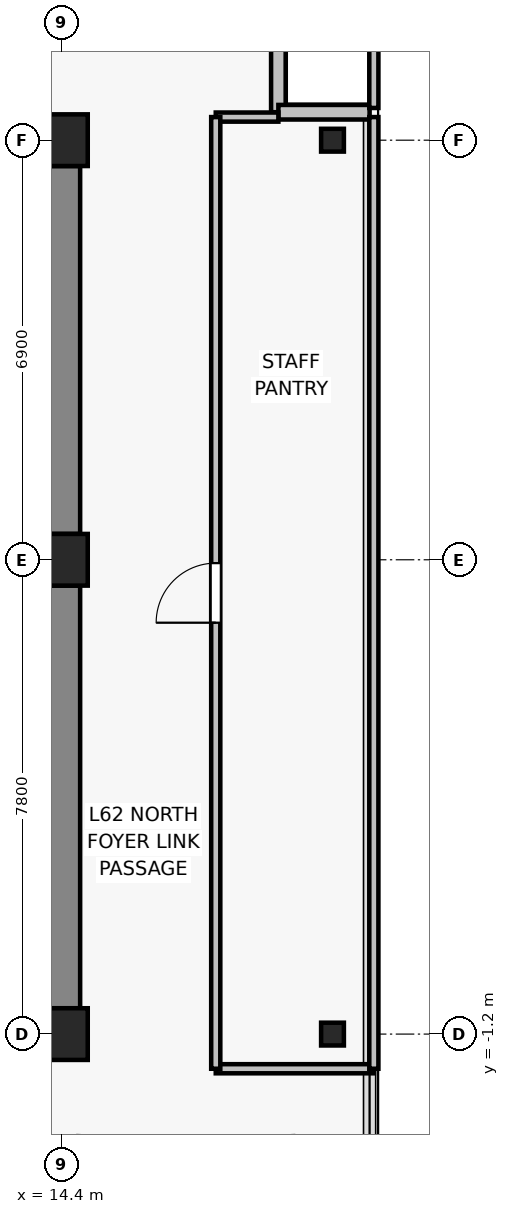
"""IFC4 building model, lengths in metres.
Left out: names, types, materials, properties, quantities, classifications, styles, units other than length and angle.
Written with IfcOpenShell. Run it as: python <this file> out.ifc"""

import sys

from ifc_helpers import new_model, si_unit, direction, frame, frame_2d, origin, origin_2d, place, context, subcontext, project, spatial, rectangle, i_section, extrude, source, transform, mapped, element, fill, save


model = new_model("IFC4")
c1 = context("Model", 3, precision=1e-05, world=origin(), true_north=direction((0.0, 1.0)))
c2 = subcontext(c1, "Body", "Model", "MODEL_VIEW")
j1 = project(units=[si_unit("LENGTHUNIT", "METRE"), si_unit("PLANEANGLEUNIT", "RADIAN")], contexts=[c1])
p1 = place(None, origin())
s1 = spatial("IfcSite", under=j1, at=p1, CompositionType="ELEMENT")
p2 = place(p1, origin())
s2 = spatial("IfcBuilding", under=s1, at=p2, CompositionType="ELEMENT")
p3 = place(p2, frame((0.0, 0.0, 222.1)))
s3 = spatial("IfcBuildingStorey", under=s2, at=p3, CompositionType="ELEMENT", Elevation=222.1)
for number, where, z_axis, x_axis in (
    (1, (14.4, -1.2, 0.0), (0.0, 0.0, 1.0), (1.0, 0.0, 0.0)),
    (2, (14.4, 6.6, 0.0), (0.0, 0.0, 1.0), (1.0, 0.0, 0.0)),
    (3, (14.4, 13.5, 0.0), (0.0, 0.0, 1.0), (1.0, 0.0, 0.0)),
):
    element("IfcColumn", number, at=place(p3, frame(where, z_axis=z_axis, x_axis=x_axis)), inside=s3, PredefinedType="COLUMN", context=c2, shape_type="SweptSolid", body=[
        extrude(rectangle(XDim=0.85, YDim=0.85, at=origin_2d()), origin(), (0.0, 0.0, 1.0), 3.3),
    ])
for number, where, z_axis, x_axis in (
    (4, (18.85, -1.2, 0.0), (0.0, 0.0, 1.0), (1.0, 0.0, 0.0)),
    (5, (18.85, 13.5, 0.0), (0.0, 0.0, 1.0), (1.0, 0.0, 0.0)),
):
    element("IfcColumn", number, at=place(p3, frame(where, z_axis=z_axis, x_axis=x_axis)), inside=s3, PredefinedType="COLUMN", context=c2, shape_type="SweptSolid", body=[
        extrude(i_section(OverallWidth=0.375, OverallDepth=0.375, WebThickness=0.017, FlangeThickness=0.027, FilletRadius=0.015, at=origin_2d()), origin(), (0.0, 0.0, 1.0), 3.3),
    ])
p4 = place(p3, frame((14.4, -0.775, 0.0), z_axis=(0.0, 0.0, 1.0), x_axis=(0.0, 1.0, 0.0)))
e6 = element("IfcWall", 6, at=p4, inside=s3, PredefinedType="SHEAR", context=c2, shape_type="SweptSolid", body=[
    extrude(rectangle(XDim=6.95, YDim=0.6, at=frame_2d((3.475, 0.0))), origin(), (0.0, 0.0, 1.0), 3.075),
])
p5 = place(p3, frame((14.4, 7.025, 0.0), z_axis=(0.0, 0.0, 1.0), x_axis=(0.0, 1.0, 0.0)))
e7 = element("IfcWall", 7, at=p5, inside=s3, PredefinedType="SHEAR", context=c2, shape_type="SweptSolid", body=[
    extrude(rectangle(XDim=6.05, YDim=0.6, at=frame_2d((3.025, 0.0))), origin(), (0.0, 0.0, 1.0), 3.075),
])
for number, where, z_axis, x_axis in (
    (8, (17.96, 13.96, 0.0), (0.0, 0.0, 1.0), (0.0, 1.0, 0.0)),
    (9, (19.46, 13.96, 0.0), (0.0, 0.0, 1.0), (-1.0, 0.0, 0.0)),
):
    element("IfcWall", number, at=place(p3, frame(where, z_axis=z_axis, x_axis=x_axis)), inside=s3, PredefinedType="SOLIDWALL", context=c2, shape_type="SweptSolid", body=[
        extrude(rectangle(XDim=1.5, YDim=0.24, at=frame_2d((0.75, 0.0))), origin(), (0.0, 0.0, 1.0), 3.075),
    ])
p6 = place(p3, frame((19.53, -1.77, 0.0), z_axis=(0.0, 0.0, 1.0), x_axis=(-1.0, 0.0, 0.0)))
e10 = element("IfcWall", 10, at=p6, inside=s3, PredefinedType="PARTITIONING", context=c2, shape_type="SweptSolid", body=[
    extrude(rectangle(XDim=2.6, YDim=0.15, at=frame_2d((1.3, 0.0))), origin(), (0.0, 0.0, 1.0), 2.765),
])
p7 = place(p3, frame((16.93, 13.88, 0.0), z_axis=(0.0, 0.0, 1.0), x_axis=(1.0, 0.0, 0.0)))
e11 = element("IfcWall", 11, at=p7, inside=s3, PredefinedType="PARTITIONING", context=c2, shape_type="SweptSolid", body=[
    extrude(rectangle(XDim=1.03, YDim=0.15, at=frame_2d((0.515, 0.0))), origin(), (0.0, 0.0, 1.0), 3.075),
])
p8 = place(p3, frame((16.93, -1.77, 0.0), z_axis=(0.0, 0.0, 1.0), x_axis=(0.0, 1.0, 0.0)))
e12 = element("IfcWall", 12, at=p8, inside=s3, PredefinedType="PARTITIONING", context=c2, shape_type="SweptSolid", body=[
    extrude(rectangle(XDim=15.65, YDim=0.15, at=frame_2d((7.825, 0.0))), origin(), (0.0, 0.0, 1.0), 2.615),
])
p9 = place(p8, frame((7.335, 0.0, 0.0)))
e13 = element("IfcOpeningElement", 13, at=p9, cuts=e12, PredefinedType="OPENING", context=c2, shape_type="SweptSolid", body=[
    extrude(rectangle(XDim=0.98, YDim=2.15, at=frame_2d((0.49, 1.075))), frame((0.0, 0.085, 0.0), z_axis=(0.0, -1.0, 0.0), x_axis=(1.0, 0.0, 0.0)), (0.0, 0.0, 1.0), 0.17),
])
p10 = place(p3, frame((19.53, 13.88, 0.0), z_axis=(0.0, 0.0, 1.0), x_axis=(0.0, -1.0, 0.0)))
e14 = element("IfcWall", 14, at=p10, inside=s3, PredefinedType="PARTITIONING", context=c2, shape_type="SweptSolid", body=[
    extrude(rectangle(XDim=15.65, YDim=0.15, at=frame_2d((7.825, 0.0))), origin(), (0.0, 0.0, 1.0), 3.075),
])
p11 = place(p3, frame((19.53, 17.03, 0.0), z_axis=(0.0, 0.0, 1.0), x_axis=(0.0, -1.0, 0.0)))
e15 = element("IfcWall", 15, at=p11, inside=s3, PredefinedType="PARTITIONING", context=c2, shape_type="SweptSolid", body=[
    extrude(rectangle(XDim=3.0, YDim=0.15, at=frame_2d((1.5, 0.0))), origin(), (0.0, 0.0, 1.0), 3.075),
])
m1 = source(origin(), c2, "Body", "SweptSolid", [
    extrude(rectangle(XDim=0.98, YDim=2.15, at=frame_2d((0.49, 1.075))), frame((0.0, 0.025, 0.0), z_axis=(0.0, -1.0, 0.0), x_axis=(1.0, 0.0, 0.0)), (0.0, 0.0, 1.0), 0.05),
])
p12 = place(p9, origin())
e16 = element("IfcDoor", 16, at=p12, inside=s3, OperationType="SINGLE_SWING_LEFT", PredefinedType="DOOR", context=c2, shape_type="MappedRepresentation", body=[
    mapped(m1, transform((0.0, 0.0, 0.0), x_axis=(1.0, 0.0, 0.0), y_axis=(0.0, 1.0, 0.0), z_axis=(0.0, 0.0, 1.0), scale=1.0)),
])
fill(e13, e16)
save(model, sys.argv[1])
